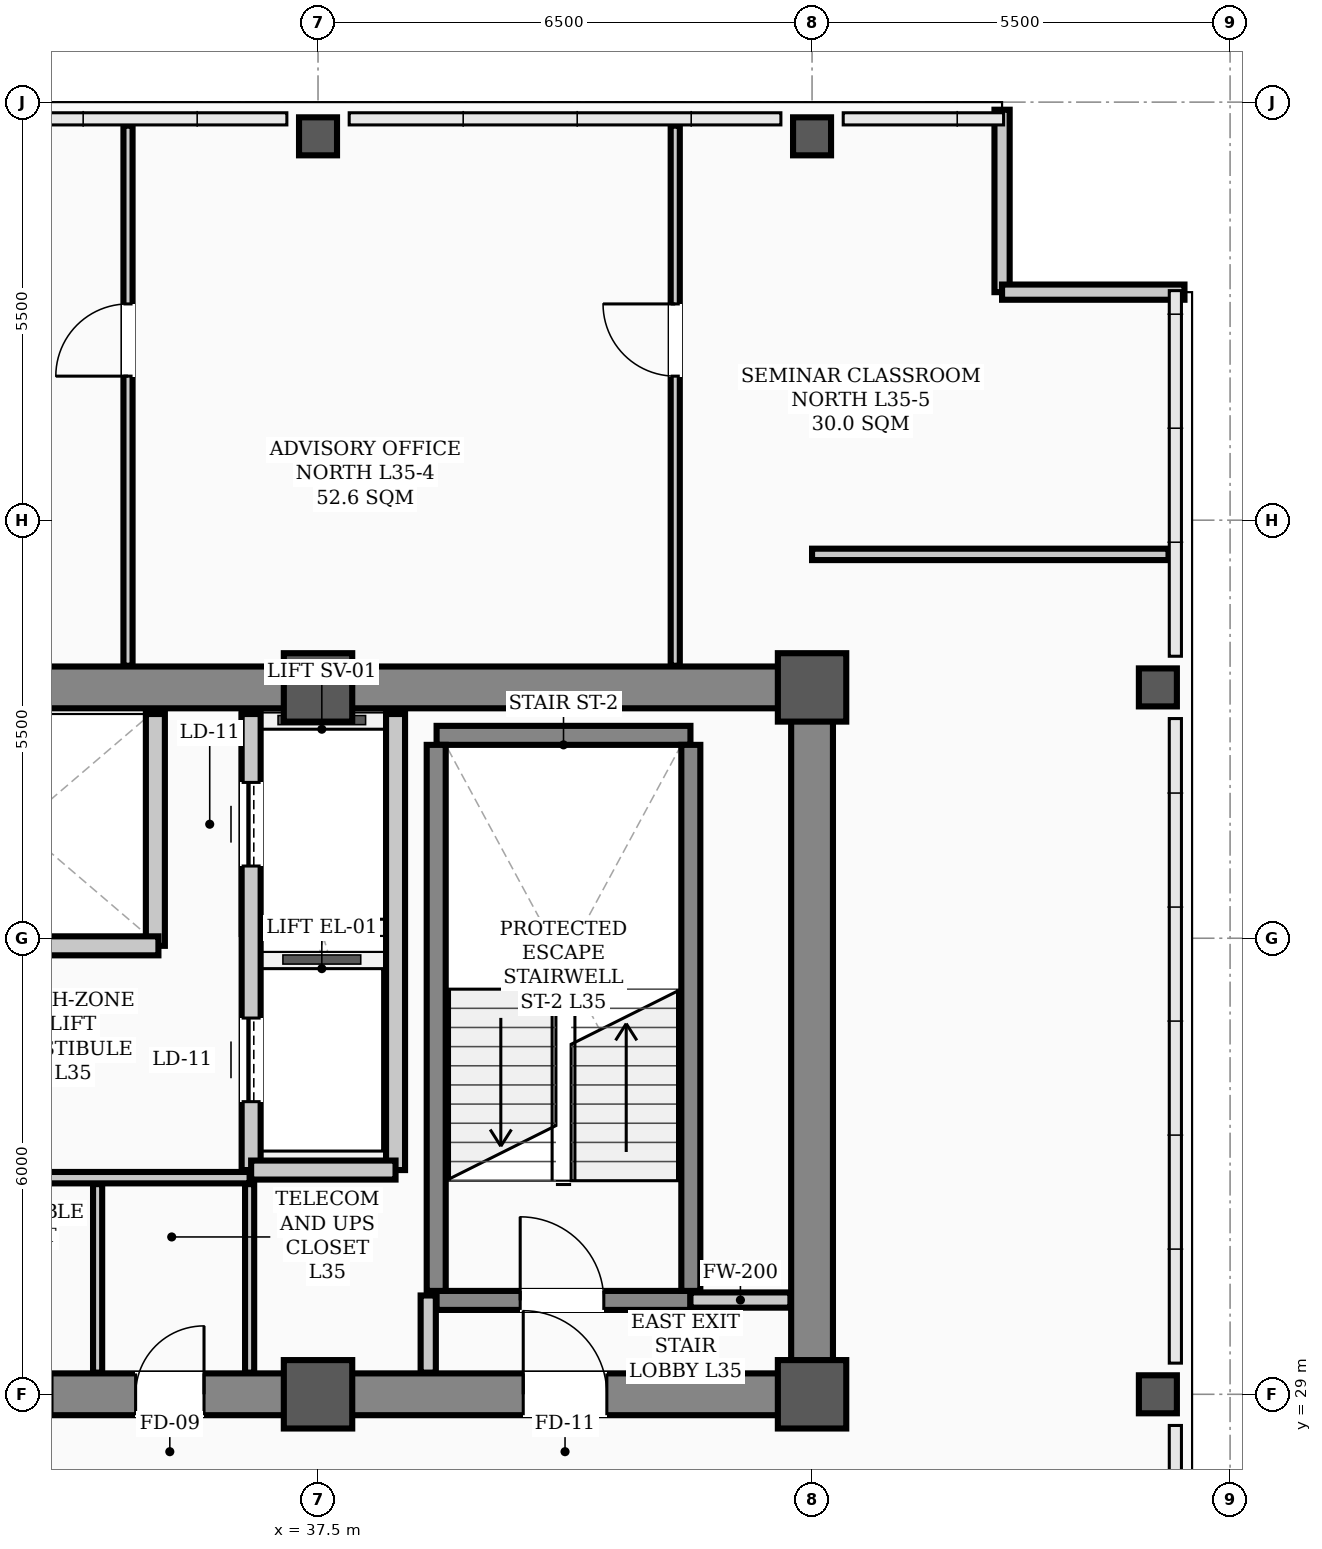
"""IFC4 building model, lengths in metres.
Left out: names, types, materials, properties, quantities, classifications, styles, units other than length and angle.
Written with IfcOpenShell. Run it as: python <this file> out.ifc"""

import sys

from ifc_helpers import new_model, si_unit, direction, frame, frame_2d, origin, origin_2d, place, context, subcontext, project, spatial, rectangle, hollow_rectangle, extrude, element, fill, save


model = new_model("IFC4")
c1 = context("Model", 3, precision=1e-05, world=origin(), true_north=direction((0.0, 1.0)))
c2 = subcontext(c1, "Body", "Model", "MODEL_VIEW")
j1 = project(units=[si_unit("LENGTHUNIT", "METRE"), si_unit("PLANEANGLEUNIT", "RADIAN")], contexts=[c1])
p1 = place(None, origin())
s1 = spatial("IfcSite", under=j1, at=p1, CompositionType="ELEMENT")
p2 = place(p1, origin())
s2 = spatial("IfcBuilding", under=s1, at=p2, CompositionType="ELEMENT")
p3 = place(p2, frame((0.0, 0.0, 142.2)))
s3 = spatial("IfcBuildingStorey", under=s2, at=p3, CompositionType="ELEMENT", Elevation=142.2)
for number, where, z_axis, x_axis in (
    (1, (37.5, 29.0, 0.0), (0.0, 0.0, 1.0), (1.0, 0.0, 0.0)),
    (2, (37.5, 38.3, 0.0), (0.0, 0.0, 1.0), (1.0, 0.0, 0.0)),
    (3, (44.0, 29.0, 0.0), (0.0, 0.0, 1.0), (1.0, 0.0, 0.0)),
    (4, (44.0, 38.3, 0.0), (0.0, 0.0, 1.0), (1.0, 0.0, 0.0)),
):
    element("IfcColumn", number, at=place(p3, frame(where, z_axis=z_axis, x_axis=x_axis)), inside=s3, PredefinedType="COLUMN", context=c2, shape_type="SweptSolid", body=[
        extrude(hollow_rectangle(XDim=0.9, YDim=0.9, WallThickness=0.035, InnerFilletRadius=0.017, OuterFilletRadius=0.052, at=origin_2d()), origin(), (0.0, 0.0, 1.0), 3.9),
    ])
for number, where, z_axis, x_axis in (
    (5, (37.5, 45.55, 0.0), (0.0, 0.0, 1.0), (1.0, 0.0, 0.0)),
    (6, (44.0, 45.55, 0.0), (0.0, 0.0, 1.0), (1.0, 0.0, 0.0)),
    (7, (48.55, 29.0, 0.0), (0.0, 0.0, 1.0), (1.0, 0.0, 0.0)),
    (8, (48.55, 38.3, 0.0), (0.0, 0.0, 1.0), (1.0, 0.0, 0.0)),
):
    element("IfcColumn", number, at=place(p3, frame(where, z_axis=z_axis, x_axis=x_axis)), inside=s3, PredefinedType="COLUMN", context=c2, shape_type="SweptSolid", body=[
        extrude(hollow_rectangle(XDim=0.5, YDim=0.5, WallThickness=0.024, InnerFilletRadius=0.012, OuterFilletRadius=0.036, at=origin_2d()), origin(), (0.0, 0.0, 1.0), 3.9),
    ])
for number, where, z_axis, x_axis in (
    (9, (46.5, 45.9, 0.0), (0.0, 0.0, 1.0), (0.0, -1.0, 0.0)),
    (10, (46.5, 43.5, 0.0), (0.0, 0.0, 1.0), (1.0, 0.0, 0.0)),
):
    element("IfcWall", number, at=place(p3, frame(where, z_axis=z_axis, x_axis=x_axis)), inside=s3, PredefinedType="PARAPET", context=c2, shape_type="SweptSolid", body=[
        extrude(rectangle(XDim=2.4, YDim=0.2, at=frame_2d((1.2, 0.0))), origin(), (0.0, 0.0, 1.0), 1.2),
    ])
p4 = place(p3, frame((13.5, 29.0, 0.0), z_axis=(0.0, 0.0, 1.0), x_axis=(1.0, 0.0, 0.0)))
e11 = element("IfcWall", 11, at=p4, inside=s3, PredefinedType="SHEAR", context=c2, shape_type="SweptSolid", body=[
    extrude(rectangle(XDim=30.5, YDim=0.55, at=frame_2d((15.25, 0.0))), origin(), (0.0, 0.0, 1.0), 3.72),
])
p5 = place(p4, frame((1.75, 0.0, 0.0)))
e12 = element("IfcOpeningElement", 12, at=p5, cuts=e11, PredefinedType="OPENING", context=c2, shape_type="SweptSolid", body=[
    extrude(rectangle(XDim=1.1, YDim=2.08, at=frame_2d((0.55, 1.04))), frame((0.0, 0.285, 0.0), z_axis=(0.0, -1.0, 0.0), x_axis=(1.0, 0.0, 0.0)), (0.0, 0.0, 1.0), 0.57),
])
p6 = place(p4, frame((26.7, 0.0, 0.0)))
e13 = element("IfcOpeningElement", 13, at=p6, cuts=e11, PredefinedType="OPENING", context=c2, shape_type="SweptSolid", body=[
    extrude(rectangle(XDim=1.1, YDim=2.08, at=frame_2d((0.55, 1.04))), frame((0.0, 0.285, 0.0), z_axis=(0.0, -1.0, 0.0), x_axis=(1.0, 0.0, 0.0)), (0.0, 0.0, 1.0), 0.57),
])
p7 = place(p4, frame((6.8, 0.0, 0.0)))
e14 = element("IfcOpeningElement", 14, at=p7, cuts=e11, PredefinedType="OPENING", context=c2, shape_type="SweptSolid", body=[
    extrude(rectangle(XDim=1.1, YDim=2.08, at=frame_2d((0.55, 1.04))), frame((0.0, 0.285, 0.0), z_axis=(0.0, -1.0, 0.0), x_axis=(1.0, 0.0, 0.0)), (0.0, 0.0, 1.0), 0.57),
])
p8 = place(p4, frame((13.2, 0.0, 0.0)))
e15 = element("IfcOpeningElement", 15, at=p8, cuts=e11, PredefinedType="OPENING", context=c2, shape_type="SweptSolid", body=[
    extrude(rectangle(XDim=1.6, YDim=2.08, at=frame_2d((0.8, 1.04))), frame((0.0, 0.285, 0.0), z_axis=(0.0, -1.0, 0.0), x_axis=(1.0, 0.0, 0.0)), (0.0, 0.0, 1.0), 0.57),
])
p9 = place(p4, frame((19.6, 0.0, 0.0)))
e16 = element("IfcOpeningElement", 16, at=p9, cuts=e11, PredefinedType="OPENING", context=c2, shape_type="SweptSolid", body=[
    extrude(rectangle(XDim=0.9, YDim=2.08, at=frame_2d((0.45, 1.04))), frame((0.0, 0.285, 0.0), z_axis=(0.0, -1.0, 0.0), x_axis=(1.0, 0.0, 0.0)), (0.0, 0.0, 1.0), 0.57),
])
p10 = place(p4, frame((21.6, 0.0, 0.0)))
e17 = element("IfcOpeningElement", 17, at=p10, cuts=e11, PredefinedType="OPENING", context=c2, shape_type="SweptSolid", body=[
    extrude(rectangle(XDim=0.9, YDim=2.08, at=frame_2d((0.45, 1.04))), frame((0.0, 0.285, 0.0), z_axis=(0.0, -1.0, 0.0), x_axis=(1.0, 0.0, 0.0)), (0.0, 0.0, 1.0), 0.57),
])
p11 = place(p3, frame((13.5, 38.3, 0.0), z_axis=(0.0, 0.0, 1.0), x_axis=(1.0, 0.0, 0.0)))
e18 = element("IfcWall", 18, at=p11, inside=s3, PredefinedType="SHEAR", context=c2, shape_type="SweptSolid", body=[
    extrude(rectangle(XDim=30.5, YDim=0.55, at=frame_2d((15.25, 0.0))), origin(), (0.0, 0.0, 1.0), 3.72),
])
p12 = place(p3, frame((44.0, 29.35, 0.0), z_axis=(0.0, 0.0, 1.0), x_axis=(0.0, 1.0, 0.0)))
e19 = element("IfcWall", 19, at=p12, inside=s3, PredefinedType="SHEAR", context=c2, shape_type="SweptSolid", body=[
    extrude(rectangle(XDim=8.6, YDim=0.55, at=frame_2d((4.3, 0.0))), origin(), (0.0, 0.0, 1.0), 3.72),
])
p13 = place(p3, frame((39.06, 30.235, 0.0), z_axis=(0.0, 0.0, 1.0), x_axis=(1.0, 0.0, 0.0)))
e20 = element("IfcWall", 20, at=p13, inside=s3, PredefinedType="STANDARD", context=c2, shape_type="SweptSolid", body=[
    extrude(rectangle(XDim=3.34, YDim=0.25, at=frame_2d((1.67, 0.0))), origin(), (0.0, 0.0, 1.0), 3.72),
])
p14 = place(p13, frame((1.1, 0.0, 0.0)))
e21 = element("IfcOpeningElement", 21, at=p14, cuts=e20, PredefinedType="OPENING", context=c2, shape_type="SweptSolid", body=[
    extrude(rectangle(XDim=1.1, YDim=2.08, at=frame_2d((0.55, 1.04))), frame((0.0, 0.135, 0.0), z_axis=(0.0, -1.0, 0.0), x_axis=(1.0, 0.0, 0.0)), (0.0, 0.0, 1.0), 0.27),
])
p15 = place(p3, frame((39.06, 37.669, 0.0), z_axis=(0.0, 0.0, 1.0), x_axis=(1.0, 0.0, 0.0)))
e22 = element("IfcWall", 22, at=p15, inside=s3, PredefinedType="STANDARD", context=c2, shape_type="SweptSolid", body=[
    extrude(rectangle(XDim=3.34, YDim=0.25, at=frame_2d((1.67, 0.0))), origin(), (0.0, 0.0, 1.0), 3.72),
])
for number, where, z_axis, x_axis in (
    (23, (39.055, 30.36, 0.0), (0.0, 0.0, 1.0), (0.0, 1.0, 0.0)),
    (24, (42.405, 30.36, 0.0), (0.0, 0.0, 1.0), (0.0, 1.0, 0.0)),
):
    element("IfcWall", number, at=place(p3, frame(where, z_axis=z_axis, x_axis=x_axis)), inside=s3, PredefinedType="STANDARD", context=c2, shape_type="SweptSolid", body=[
        extrude(rectangle(XDim=7.184, YDim=0.25, at=frame_2d((3.592, 0.0))), origin(), (0.0, 0.0, 1.0), 3.72),
    ])
p16 = place(p3, frame((36.62, 31.95, 0.0), z_axis=(0.0, 0.0, 1.0), x_axis=(0.0, 1.0, 0.0)))
e25 = element("IfcWall", 25, at=p16, inside=s3, PredefinedType="STANDARD", context=c2, shape_type="SweptSolid", body=[
    extrude(rectangle(XDim=6.0, YDim=0.25, at=frame_2d((3.0, 0.0))), origin(), (0.0, 0.0, 1.0), 3.3),
])
p17 = place(p16, frame((0.9, 0.0, 0.0)))
e26 = element("IfcOpeningElement", 26, at=p17, cuts=e25, PredefinedType="OPENING", context=c2, shape_type="SweptSolid", body=[
    extrude(rectangle(XDim=1.1, YDim=2.08, at=frame_2d((0.55, 1.04))), frame((0.0, 0.135, 0.0), z_axis=(0.0, -1.0, 0.0), x_axis=(1.0, 0.0, 0.0)), (0.0, 0.0, 1.0), 0.27),
])
p18 = place(p16, frame((4.0, 0.0, 0.0)))
e27 = element("IfcOpeningElement", 27, at=p18, cuts=e25, PredefinedType="OPENING", context=c2, shape_type="SweptSolid", body=[
    extrude(rectangle(XDim=1.1, YDim=2.08, at=frame_2d((0.55, 1.04))), frame((0.0, 0.135, 0.0), z_axis=(0.0, -1.0, 0.0), x_axis=(1.0, 0.0, 0.0)), (0.0, 0.0, 1.0), 0.27),
])
p19 = place(p3, frame((38.52, 31.95, 0.0), z_axis=(0.0, 0.0, 1.0), x_axis=(0.0, 1.0, 0.0)))
e28 = element("IfcWall", 28, at=p19, inside=s3, PredefinedType="STANDARD", context=c2, shape_type="SweptSolid", body=[
    extrude(rectangle(XDim=6.0, YDim=0.25, at=frame_2d((3.0, 0.0))), origin(), (0.0, 0.0, 1.0), 3.3),
])
p20 = place(p3, frame((36.62, 31.95, 0.0), z_axis=(0.0, 0.0, 1.0), x_axis=(1.0, 0.0, 0.0)))
e29 = element("IfcWall", 29, at=p20, inside=s3, PredefinedType="STANDARD", context=c2, shape_type="SweptSolid", body=[
    extrude(rectangle(XDim=1.9, YDim=0.25, at=frame_2d((0.95, 0.0))), origin(), (0.0, 0.0, 1.0), 3.48),
])
p21 = place(p3, frame((35.36, 34.9, 0.0), z_axis=(0.0, 0.0, 1.0), x_axis=(0.0, 1.0, 0.0)))
e30 = element("IfcWall", 30, at=p21, inside=s3, PredefinedType="STANDARD", context=c2, shape_type="SweptSolid", body=[
    extrude(rectangle(XDim=3.05, YDim=0.25, at=frame_2d((1.525, 0.0))), origin(), (0.0, 0.0, 1.0), 3.3),
])
p22 = place(p3, frame((31.8, 34.9, 0.0), z_axis=(0.0, 0.0, 1.0), x_axis=(1.0, 0.0, 0.0)))
e31 = element("IfcWall", 31, at=p22, inside=s3, PredefinedType="STANDARD", context=c2, shape_type="SweptSolid", body=[
    extrude(rectangle(XDim=3.6, YDim=0.25, at=frame_2d((1.8, 0.0))), origin(), (0.0, 0.0, 1.0), 3.72),
])
p23 = place(p3, frame((42.4, 30.24, 0.0), z_axis=(0.0, 0.0, 1.0), x_axis=(1.0, 0.0, 0.0)))
e32 = element("IfcWall", 32, at=p23, inside=s3, PredefinedType="STANDARD", context=c2, shape_type="SweptSolid", body=[
    extrude(rectangle(XDim=1.315, YDim=0.2, at=frame_2d((0.658, 0.0))), origin(), (0.0, 0.0, 1.0), 3.1),
])
p24 = place(p3, frame((32.5, 31.85, 0.0), z_axis=(0.0, 0.0, 1.0), x_axis=(1.0, 0.0, 0.0)))
e33 = element("IfcWall", 33, at=p24, inside=s3, PredefinedType="PARTITIONING", context=c2, shape_type="SweptSolid", body=[
    extrude(rectangle(XDim=4.1, YDim=0.15, at=frame_2d((2.05, 0.0))), origin(), (0.0, 0.0, 1.0), 3.72),
])
p25 = place(p3, frame((44.0, 40.05, 0.0), z_axis=(0.0, 0.0, 1.0), x_axis=(1.0, 0.0, 0.0)))
e34 = element("IfcWall", 34, at=p25, inside=s3, PredefinedType="PARTITIONING", context=c2, shape_type="SweptSolid", body=[
    extrude(rectangle(XDim=4.69, YDim=0.15, at=frame_2d((2.345, 0.0))), origin(), (0.0, 0.0, 1.0), 3.1),
])
p26 = place(p3, frame((38.95, 29.285, 0.0), z_axis=(0.0, 0.0, 1.0), x_axis=(0.0, 1.0, 0.0)))
e35 = element("IfcWall", 35, at=p26, inside=s3, PredefinedType="STANDARD", context=c2, shape_type="SweptSolid", body=[
    extrude(rectangle(XDim=1.015, YDim=0.2, at=frame_2d((0.508, 0.0))), origin(), (0.0, 0.0, 1.0), 3.3),
])
for number, where, z_axis, x_axis in (
    (36, (36.6, 29.285, 0.0), (0.0, 0.0, 1.0), (0.0, 1.0, 0.0)),
    (37, (34.6, 29.285, 0.0), (0.0, 0.0, 1.0), (0.0, 1.0, 0.0)),
):
    element("IfcWall", number, at=place(p3, frame(where, z_axis=z_axis, x_axis=x_axis)), inside=s3, PredefinedType="PARTITIONING", context=c2, shape_type="SweptSolid", body=[
        extrude(rectangle(XDim=2.48, YDim=0.12, at=frame_2d((1.24, 0.0))), origin(), (0.0, 0.0, 1.0), 3.3),
    ])
p27 = place(p3, frame((35.0, 38.585, 0.0), z_axis=(0.0, 0.0, 1.0), x_axis=(0.0, 1.0, 0.0)))
e38 = element("IfcWall", 38, at=p27, inside=s3, PredefinedType="PARTITIONING", context=c2, shape_type="SweptSolid", body=[
    extrude(rectangle(XDim=7.105, YDim=0.12, at=frame_2d((3.552, 0.0))), origin(), (0.0, 0.0, 1.0), 3.212),
])
p28 = place(p27, frame((3.81, 0.0, 0.0)))
e39 = element("IfcOpeningElement", 39, at=p28, cuts=e38, PredefinedType="OPENING", context=c2, shape_type="SweptSolid", body=[
    extrude(rectangle(XDim=0.95, YDim=2.08, at=frame_2d((0.475, 1.04))), frame((0.0, 0.07, 0.0), z_axis=(0.0, -1.0, 0.0), x_axis=(1.0, 0.0, 0.0)), (0.0, 0.0, 1.0), 0.14),
])
p29 = place(p3, frame((42.2, 38.585, 0.0), z_axis=(0.0, 0.0, 1.0), x_axis=(0.0, 1.0, 0.0)))
e40 = element("IfcWall", 40, at=p29, inside=s3, PredefinedType="PARTITIONING", context=c2, shape_type="SweptSolid", body=[
    extrude(rectangle(XDim=7.105, YDim=0.12, at=frame_2d((3.552, 0.0))), origin(), (0.0, 0.0, 1.0), 3.212),
])
p30 = place(p29, frame((3.81, 0.0, 0.0)))
e41 = element("IfcOpeningElement", 41, at=p30, cuts=e40, PredefinedType="OPENING", context=c2, shape_type="SweptSolid", body=[
    extrude(rectangle(XDim=0.95, YDim=2.08, at=frame_2d((0.475, 1.04))), frame((0.0, 0.07, 0.0), z_axis=(0.0, -1.0, 0.0), x_axis=(1.0, 0.0, 0.0)), (0.0, 0.0, 1.0), 0.14),
])
p31 = place(p14, origin())
e42 = element("IfcDoor", 42, at=p31, inside=s3, OperationType="SINGLE_SWING_LEFT", PredefinedType="DOOR", context=c2, shape_type="SweptSolid", body=[
    extrude(rectangle(XDim=1.1, YDim=2.08, at=frame_2d((0.55, 1.04))), frame((0.0, 0.025, 0.0), z_axis=(0.0, -1.0, 0.0), x_axis=(1.0, 0.0, 0.0)), (0.0, 0.0, 1.0), 0.05),
])
fill(e21, e42)
p32 = place(p6, origin())
e43 = element("IfcDoor", 43, at=p32, inside=s3, OperationType="SINGLE_SWING_LEFT", PredefinedType="DOOR", context=c2, shape_type="SweptSolid", body=[
    extrude(rectangle(XDim=1.1, YDim=2.08, at=frame_2d((0.55, 1.04))), frame((0.0, 0.025, 0.0), z_axis=(0.0, -1.0, 0.0), x_axis=(1.0, 0.0, 0.0)), (0.0, 0.0, 1.0), 0.05),
])
fill(e13, e43)
p33 = place(p10, origin())
e44 = element("IfcDoor", 44, at=p33, inside=s3, OperationType="SINGLE_SWING_RIGHT", PredefinedType="DOOR", context=c2, shape_type="SweptSolid", body=[
    extrude(rectangle(XDim=0.9, YDim=2.08, at=frame_2d((0.45, 1.04))), frame((0.0, 0.025, 0.0), z_axis=(0.0, -1.0, 0.0), x_axis=(1.0, 0.0, 0.0)), (0.0, 0.0, 1.0), 0.05),
])
fill(e17, e44)
p34 = place(p28, origin())
e45 = element("IfcDoor", 45, at=p34, inside=s3, OperationType="SINGLE_SWING_LEFT", PredefinedType="DOOR", context=c2, shape_type="SweptSolid", body=[
    extrude(rectangle(XDim=0.95, YDim=2.08, at=frame_2d((0.475, 1.04))), frame((0.0, 0.025, 0.0), z_axis=(0.0, -1.0, 0.0), x_axis=(1.0, 0.0, 0.0)), (0.0, 0.0, 1.0), 0.05),
])
fill(e39, e45)
p35 = place(p30, origin())
e46 = element("IfcDoor", 46, at=p35, inside=s3, OperationType="SINGLE_SWING_RIGHT", PredefinedType="DOOR", context=c2, shape_type="SweptSolid", body=[
    extrude(rectangle(XDim=0.95, YDim=2.08, at=frame_2d((0.475, 1.04))), frame((0.0, 0.025, 0.0), z_axis=(0.0, -1.0, 0.0), x_axis=(1.0, 0.0, 0.0)), (0.0, 0.0, 1.0), 0.05),
])
fill(e41, e46)
p36 = place(p17, origin())
e47 = element("IfcDoor", 47, at=p36, inside=s3, OperationType="SLIDING_TO_LEFT", PredefinedType="DOOR", context=c2, shape_type="SweptSolid", body=[
    extrude(rectangle(XDim=1.1, YDim=2.08, at=frame_2d((0.55, 1.04))), frame((0.0, 0.025, 0.0), z_axis=(0.0, -1.0, 0.0), x_axis=(1.0, 0.0, 0.0)), (0.0, 0.0, 1.0), 0.05),
])
fill(e26, e47)
p37 = place(p18, origin())
e48 = element("IfcDoor", 48, at=p37, inside=s3, OperationType="SLIDING_TO_LEFT", PredefinedType="DOOR", context=c2, shape_type="SweptSolid", body=[
    extrude(rectangle(XDim=1.1, YDim=2.08, at=frame_2d((0.55, 1.04))), frame((0.0, 0.025, 0.0), z_axis=(0.0, -1.0, 0.0), x_axis=(1.0, 0.0, 0.0)), (0.0, 0.0, 1.0), 0.05),
])
fill(e27, e48)
save(model, sys.argv[1])
